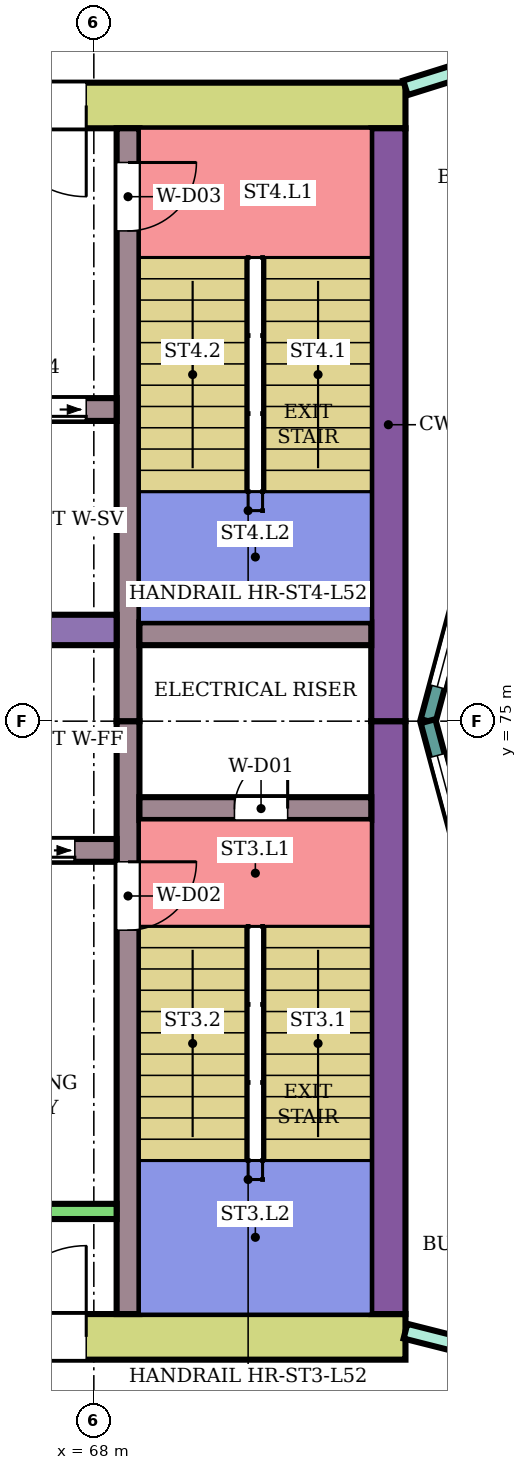
"""IFC4 building model, lengths in metres.
Left out: names, types, materials, properties, quantities, classifications, styles, units other than length and angle.
Written with IfcOpenShell. Run it as: python <this file> out.ifc"""

import sys

from ifc_helpers import new_model, si_unit, direction, frame, frame_2d, origin, place, context, subcontext, project, spatial, rectangle, extrude, element, fill, save


model = new_model("IFC4")
c1 = context("Model", 3, precision=1e-05, world=origin(), true_north=direction((0.0, 1.0)))
c2 = subcontext(c1, "Body", "Model", "MODEL_VIEW")
j1 = project(units=[si_unit("LENGTHUNIT", "METRE"), si_unit("PLANEANGLEUNIT", "RADIAN")], contexts=[c1])
p1 = place(None, origin())
s1 = spatial("IfcSite", under=j1, at=p1, CompositionType="ELEMENT")
p2 = place(p1, origin())
s2 = spatial("IfcBuilding", under=s1, at=p2, CompositionType="ELEMENT")
p3 = place(p2, frame((0.0, 0.0, 225.1)))
s3 = spatial("IfcBuildingStorey", under=s2, at=p3, CompositionType="ELEMENT", Elevation=225.1)
p4 = place(p3, frame((72.1, 66.9, 0.0), z_axis=(0.0, 0.0, 1.0), x_axis=(-1.0, 0.0, 0.0)))
e1 = element("IfcWall", 1, at=p4, inside=s3, PredefinedType="SHEAR", context=c2, shape_type="SweptSolid", body=[
    extrude(rectangle(XDim=14.9, YDim=0.6, at=frame_2d((7.45, 0.0))), origin(), (0.0, 0.0, 1.0), 3.8),
])
p5 = place(p4, frame((4.2, 0.0, 0.0)))
e2 = element("IfcOpeningElement", 2, at=p5, cuts=e1, PredefinedType="OPENING", context=c2, shape_type="SweptSolid", body=[
    extrude(rectangle(XDim=2.4, YDim=2.4, at=frame_2d((1.2, 1.2))), frame((0.0, 0.31, 0.0), z_axis=(0.0, -1.0, 0.0), x_axis=(1.0, 0.0, 0.0)), (0.0, 0.0, 1.0), 0.62),
])
p6 = place(p3, frame((72.1, 83.1, 0.0), z_axis=(0.0, 0.0, 1.0), x_axis=(-1.0, 0.0, 0.0)))
e3 = element("IfcWall", 3, at=p6, inside=s3, PredefinedType="SHEAR", context=c2, shape_type="SweptSolid", body=[
    extrude(rectangle(XDim=14.9, YDim=0.6, at=frame_2d((7.45, 0.0))), origin(), (0.0, 0.0, 1.0), 3.8),
])
p7 = place(p6, frame((4.2, 0.0, 0.0)))
e4 = element("IfcOpeningElement", 4, at=p7, cuts=e3, PredefinedType="OPENING", context=c2, shape_type="SweptSolid", body=[
    extrude(rectangle(XDim=2.4, YDim=2.4, at=frame_2d((1.2, 1.2))), frame((0.0, 0.31, 0.0), z_axis=(0.0, -1.0, 0.0), x_axis=(1.0, 0.0, 0.0)), (0.0, 0.0, 1.0), 0.62),
])
for number, where, z_axis, x_axis in (
    (5, (71.875, 75.0, 0.0), (0.0, 0.0, 1.0), (0.0, -1.0, 0.0)),
    (6, (71.875, 82.8, 0.0), (0.0, 0.0, 1.0), (0.0, -1.0, 0.0)),
):
    element("IfcWall", number, at=place(p3, frame(where, z_axis=z_axis, x_axis=x_axis)), inside=s3, PredefinedType="SHEAR", context=c2, shape_type="SweptSolid", body=[
        extrude(rectangle(XDim=7.8, YDim=0.45, at=frame_2d((3.9, 0.0))), origin(), (0.0, 0.0, 1.0), 3.8),
    ])
p8 = place(p3, frame((68.45, 75.0, 0.0), z_axis=(0.0, 0.0, 1.0), x_axis=(0.0, -1.0, 0.0)))
e7 = element("IfcWall", 7, at=p8, inside=s3, PredefinedType="SHEAR", context=c2, shape_type="SweptSolid", body=[
    extrude(rectangle(XDim=7.8, YDim=0.3, at=frame_2d((3.9, 0.0))), origin(), (0.0, 0.0, 1.0), 3.8),
])
p9 = place(p8, frame((1.85, 0.0, 0.0)))
e8 = element("IfcOpeningElement", 8, at=p9, cuts=e7, PredefinedType="OPENING", context=c2, shape_type="SweptSolid", body=[
    extrude(rectangle(XDim=0.9, YDim=2.1, at=frame_2d((0.45, 1.05))), frame((0.0, 0.16, 0.0), z_axis=(0.0, -1.0, 0.0), x_axis=(1.0, 0.0, 0.0)), (0.0, 0.0, 1.0), 0.32),
])
p10 = place(p3, frame((68.45, 82.8, 0.0), z_axis=(0.0, 0.0, 1.0), x_axis=(0.0, -1.0, 0.0)))
e9 = element("IfcWall", 9, at=p10, inside=s3, PredefinedType="SHEAR", context=c2, shape_type="SweptSolid", body=[
    extrude(rectangle(XDim=7.8, YDim=0.3, at=frame_2d((3.9, 0.0))), origin(), (0.0, 0.0, 1.0), 3.8),
])
p11 = place(p10, frame((0.45, 0.0, 0.0)))
e10 = element("IfcOpeningElement", 10, at=p11, cuts=e9, PredefinedType="OPENING", context=c2, shape_type="SweptSolid", body=[
    extrude(rectangle(XDim=0.9, YDim=2.1, at=frame_2d((0.45, 1.05))), frame((0.0, 0.16, 0.0), z_axis=(0.0, -1.0, 0.0), x_axis=(1.0, 0.0, 0.0)), (0.0, 0.0, 1.0), 0.32),
])
p12 = place(p3, frame((71.65, 73.85, 0.0), z_axis=(0.0, 0.0, 1.0), x_axis=(-1.0, 0.0, 0.0)))
e11 = element("IfcWall", 11, at=p12, inside=s3, PredefinedType="SHEAR", context=c2, shape_type="SweptSolid", body=[
    extrude(rectangle(XDim=3.05, YDim=0.3, at=frame_2d((1.525, 0.0))), origin(), (0.0, 0.0, 1.0), 3.8),
])
p13 = place(p12, frame((1.1, 0.0, 0.0)))
e12 = element("IfcOpeningElement", 12, at=p13, cuts=e11, PredefinedType="OPENING", context=c2, shape_type="SweptSolid", body=[
    extrude(rectangle(XDim=0.7, YDim=2.0, at=frame_2d((0.35, 1.0))), frame((0.0, 0.16, 0.0), z_axis=(0.0, -1.0, 0.0), x_axis=(1.0, 0.0, 0.0)), (0.0, 0.0, 1.0), 0.32),
])
p14 = place(p3, frame((71.65, 76.15, 0.0), z_axis=(0.0, 0.0, 1.0), x_axis=(-1.0, 0.0, 0.0)))
e13 = element("IfcWall", 13, at=p14, inside=s3, PredefinedType="SHEAR", context=c2, shape_type="SweptSolid", body=[
    extrude(rectangle(XDim=3.05, YDim=0.3, at=frame_2d((1.525, 0.0))), origin(), (0.0, 0.0, 1.0), 3.8),
])
p15 = place(p3, frame((68.3, 73.3, 0.0), z_axis=(0.0, 0.0, 1.0), x_axis=(-1.0, 0.0, 0.0)))
e14 = element("IfcWall", 14, at=p15, inside=s3, PredefinedType="SHEAR", context=c2, shape_type="SweptSolid", body=[
    extrude(rectangle(XDim=11.1, YDim=0.3, at=frame_2d((5.55, 0.0))), origin(), (0.0, 0.0, 1.0), 3.8),
])
p16 = place(p15, frame((0.55, 0.0, 0.0)))
e15 = element("IfcOpeningElement", 15, at=p16, cuts=e14, PredefinedType="OPENING", context=c2, shape_type="SweptSolid", body=[
    extrude(rectangle(XDim=1.1, YDim=2.1, at=frame_2d((0.55, 1.05))), frame((0.0, 0.16, 0.0), z_axis=(0.0, -1.0, 0.0), x_axis=(1.0, 0.0, 0.0)), (0.0, 0.0, 1.0), 0.32),
])
p17 = place(p15, frame((3.0, 0.0, 0.0)))
e16 = element("IfcOpeningElement", 16, at=p17, cuts=e14, PredefinedType="OPENING", context=c2, shape_type="SweptSolid", body=[
    extrude(rectangle(XDim=1.2, YDim=2.1, at=frame_2d((0.6, 1.05))), frame((0.0, 0.16, 0.0), z_axis=(0.0, -1.0, 0.0), x_axis=(1.0, 0.0, 0.0)), (0.0, 0.0, 1.0), 0.32),
])
p18 = place(p15, frame((5.5, 0.0, 0.0)))
e17 = element("IfcOpeningElement", 17, at=p18, cuts=e14, PredefinedType="OPENING", context=c2, shape_type="SweptSolid", body=[
    extrude(rectangle(XDim=1.2, YDim=2.1, at=frame_2d((0.6, 1.05))), frame((0.0, 0.16, 0.0), z_axis=(0.0, -1.0, 0.0), x_axis=(1.0, 0.0, 0.0)), (0.0, 0.0, 1.0), 0.32),
])
p19 = place(p15, frame((8.85, 0.0, 0.0)))
e18 = element("IfcOpeningElement", 18, at=p19, cuts=e14, PredefinedType="OPENING", context=c2, shape_type="SweptSolid", body=[
    extrude(rectangle(XDim=0.9, YDim=2.1, at=frame_2d((0.45, 1.05))), frame((0.0, 0.16, 0.0), z_axis=(0.0, -1.0, 0.0), x_axis=(1.0, 0.0, 0.0)), (0.0, 0.0, 1.0), 0.32),
])
p20 = place(p3, frame((68.3, 76.2, 0.0), z_axis=(0.0, 0.0, 1.0), x_axis=(-1.0, 0.0, 0.0)))
e19 = element("IfcWall", 19, at=p20, inside=s3, PredefinedType="SHEAR", context=c2, shape_type="SweptSolid", body=[
    extrude(rectangle(XDim=11.1, YDim=0.4, at=frame_2d((5.55, 0.0))), origin(), (0.0, 0.0, 1.0), 3.8),
])
p21 = place(p3, frame((68.3, 79.1, 0.0), z_axis=(0.0, 0.0, 1.0), x_axis=(-1.0, 0.0, 0.0)))
e20 = element("IfcWall", 20, at=p21, inside=s3, PredefinedType="SHEAR", context=c2, shape_type="SweptSolid", body=[
    extrude(rectangle(XDim=11.1, YDim=0.3, at=frame_2d((5.55, 0.0))), origin(), (0.0, 0.0, 1.0), 3.8),
])
p22 = place(p21, frame((0.4, 0.0, 0.0)))
e21 = element("IfcOpeningElement", 21, at=p22, cuts=e20, PredefinedType="OPENING", context=c2, shape_type="SweptSolid", body=[
    extrude(rectangle(XDim=1.4, YDim=2.1, at=frame_2d((0.7, 1.05))), frame((0.0, 0.16, 0.0), z_axis=(0.0, -1.0, 0.0), x_axis=(1.0, 0.0, 0.0)), (0.0, 0.0, 1.0), 0.32),
])
p23 = place(p21, frame((3.0, 0.0, 0.0)))
e22 = element("IfcOpeningElement", 22, at=p23, cuts=e20, PredefinedType="OPENING", context=c2, shape_type="SweptSolid", body=[
    extrude(rectangle(XDim=1.2, YDim=2.1, at=frame_2d((0.6, 1.05))), frame((0.0, 0.16, 0.0), z_axis=(0.0, -1.0, 0.0), x_axis=(1.0, 0.0, 0.0)), (0.0, 0.0, 1.0), 0.32),
])
p24 = place(p21, frame((5.567, 0.0, 0.0)))
e23 = element("IfcOpeningElement", 23, at=p24, cuts=e20, PredefinedType="OPENING", context=c2, shape_type="SweptSolid", body=[
    extrude(rectangle(XDim=0.9, YDim=2.1, at=frame_2d((0.45, 1.05))), frame((0.0, 0.16, 0.0), z_axis=(0.0, -1.0, 0.0), x_axis=(1.0, 0.0, 0.0)), (0.0, 0.0, 1.0), 0.32),
])
p25 = place(p21, frame((7.6, 0.0, 0.0)))
e24 = element("IfcOpeningElement", 24, at=p25, cuts=e20, PredefinedType="OPENING", context=c2, shape_type="SweptSolid", body=[
    extrude(rectangle(XDim=0.9, YDim=2.1, at=frame_2d((0.45, 1.05))), frame((0.0, 0.16, 0.0), z_axis=(0.0, -1.0, 0.0), x_axis=(1.0, 0.0, 0.0)), (0.0, 0.0, 1.0), 0.32),
])
p26 = place(p21, frame((9.633, 0.0, 0.0)))
e25 = element("IfcOpeningElement", 25, at=p26, cuts=e20, PredefinedType="OPENING", context=c2, shape_type="SweptSolid", body=[
    extrude(rectangle(XDim=0.9, YDim=2.1, at=frame_2d((0.45, 1.05))), frame((0.0, 0.16, 0.0), z_axis=(0.0, -1.0, 0.0), x_axis=(1.0, 0.0, 0.0)), (0.0, 0.0, 1.0), 0.32),
])
p27 = place(p3, frame((68.3, 68.55, 0.0), z_axis=(0.0, 0.0, 1.0), x_axis=(-1.0, 0.0, 0.0)))
e26 = element("IfcWall", 26, at=p27, inside=s3, PredefinedType="SHEAR", context=c2, shape_type="SweptSolid", body=[
    extrude(rectangle(XDim=4.35, YDim=0.2, at=frame_2d((2.175, 0.0))), origin(), (0.0, 0.0, 1.0), 3.8),
])
p28 = place(p3, frame((73.415, 78.802, 0.0), z_axis=(0.0, 0.0, 1.0), x_axis=(-0.258789828301, -0.965933654434, 0.0)))
e27 = element("IfcWall", 27, at=p28, inside=s3, PredefinedType="NOTDEFINED", context=c2, shape_type="SweptSolid", body=[
    extrude(rectangle(XDim=3.936, YDim=0.2, at=frame_2d((1.968, 0.0))), origin(), (0.0, 0.0, 1.0), 4.2),
])
p29 = place(p28, frame((0.468, 0.0, 0.9)))
e28 = element("IfcOpeningElement", 28, at=p29, cuts=e27, PredefinedType="OPENING", context=c2, shape_type="SweptSolid", body=[
    extrude(rectangle(XDim=3.0, YDim=2.3, at=frame_2d((1.5, 1.15))), frame((0.0, 0.11, 0.0), z_axis=(0.0, -1.0, 0.0), x_axis=(1.0, 0.0, 0.0)), (0.0, 0.0, 1.0), 0.22),
])
p30 = place(p3, frame((72.396, 75.0, 0.0), z_axis=(0.0, 0.0, 1.0), x_axis=(0.258789828301, -0.965933654434, 0.0)))
e29 = element("IfcWall", 29, at=p30, inside=s3, PredefinedType="NOTDEFINED", context=c2, shape_type="SweptSolid", body=[
    extrude(rectangle(XDim=3.936, YDim=0.2, at=frame_2d((1.968, 0.0))), origin(), (0.0, 0.0, 1.0), 4.2),
])
p31 = place(p30, frame((0.468, 0.0, 0.9)))
e30 = element("IfcOpeningElement", 30, at=p31, cuts=e29, PredefinedType="OPENING", context=c2, shape_type="SweptSolid", body=[
    extrude(rectangle(XDim=3.0, YDim=2.3, at=frame_2d((1.5, 1.15))), frame((0.0, 0.11, 0.0), z_axis=(0.0, -1.0, 0.0), x_axis=(1.0, 0.0, 0.0)), (0.0, 0.0, 1.0), 0.22),
])
p32 = place(p3, frame((72.1, 66.975, 0.0), z_axis=(0.0, 0.0, 1.0), x_axis=(0.969471314457, -0.245204752086, 0.0)))
e31 = element("IfcWall", 31, at=p32, inside=s3, PredefinedType="PARTITIONING", context=c2, shape_type="SweptSolid", body=[
    extrude(rectangle(XDim=2.582, YDim=0.2, at=frame_2d((1.291, 0.0))), origin(), (0.0, 0.0, 1.0), 3.75),
])
p33 = place(p32, frame((0.841, 0.0, 0.0)))
e32 = element("IfcOpeningElement", 32, at=p33, cuts=e31, PredefinedType="OPENING", context=c2, shape_type="SweptSolid", body=[
    extrude(rectangle(XDim=0.9, YDim=2.1, at=frame_2d((0.45, 1.05))), frame((0.0, 0.11, 0.0), z_axis=(0.0, -1.0, 0.0), x_axis=(1.0, 0.0, 0.0)), (0.0, 0.0, 1.0), 0.22),
])
p34 = place(p3, frame((72.1, 83.332, 0.0), z_axis=(0.0, 0.0, 1.0), x_axis=(0.954233106619, 0.299063836383, 0.0)))
e33 = element("IfcWall", 33, at=p34, inside=s3, PredefinedType="PARTITIONING", context=c2, shape_type="SweptSolid", body=[
    extrude(rectangle(XDim=2.414, YDim=0.2, at=frame_2d((1.207, 0.0))), origin(), (0.0, 0.0, 1.0), 3.75),
])
p35 = place(p34, frame((0.762, 0.0, 0.0)))
e34 = element("IfcOpeningElement", 34, at=p35, cuts=e33, PredefinedType="OPENING", context=c2, shape_type="SweptSolid", body=[
    extrude(rectangle(XDim=0.9, YDim=2.1, at=frame_2d((0.45, 1.05))), frame((0.0, 0.11, 0.0), z_axis=(0.0, -1.0, 0.0), x_axis=(1.0, 0.0, 0.0)), (0.0, 0.0, 1.0), 0.22),
])
p36 = place(p29, origin())
e35 = element("IfcWindow", 35, at=p36, inside=s3, PartitioningType="SINGLE_PANEL", PredefinedType="WINDOW", context=c2, shape_type="SweptSolid", body=[
    extrude(rectangle(XDim=3.0, YDim=2.3, at=frame_2d((1.5, 1.15))), frame((0.0, 0.03, 0.0), z_axis=(0.0, -1.0, 0.0), x_axis=(1.0, 0.0, 0.0)), (0.0, 0.0, 1.0), 0.06),
])
fill(e28, e35)
p37 = place(p31, origin())
e36 = element("IfcWindow", 36, at=p37, inside=s3, PartitioningType="SINGLE_PANEL", PredefinedType="WINDOW", context=c2, shape_type="SweptSolid", body=[
    extrude(rectangle(XDim=3.0, YDim=2.3, at=frame_2d((1.5, 1.15))), frame((0.0, 0.03, 0.0), z_axis=(0.0, -1.0, 0.0), x_axis=(1.0, 0.0, 0.0)), (0.0, 0.0, 1.0), 0.06),
])
fill(e30, e36)
p38 = place(p13, frame((0.7, 0.0, 0.0), z_axis=(0.0, 0.0, 1.0), x_axis=(-1.0, 0.0, 0.0)))
e37 = element("IfcDoor", 37, at=p38, inside=s3, OperationType="SINGLE_SWING_RIGHT", PredefinedType="DOOR", context=c2, shape_type="SweptSolid", body=[
    extrude(rectangle(XDim=0.7, YDim=2.0, at=frame_2d((0.35, 1.0))), frame((0.0, 0.025, 0.0), z_axis=(0.0, -1.0, 0.0), x_axis=(1.0, 0.0, 0.0)), (0.0, 0.0, 1.0), 0.05),
])
fill(e12, e37)
p39 = place(p9, origin())
e38 = element("IfcDoor", 38, at=p39, inside=s3, OperationType="SINGLE_SWING_LEFT", PredefinedType="DOOR", context=c2, shape_type="SweptSolid", body=[
    extrude(rectangle(XDim=0.9, YDim=2.1, at=frame_2d((0.45, 1.05))), frame((0.0, 0.025, 0.0), z_axis=(0.0, -1.0, 0.0), x_axis=(1.0, 0.0, 0.0)), (0.0, 0.0, 1.0), 0.05),
])
fill(e8, e38)
p40 = place(p11, origin())
e39 = element("IfcDoor", 39, at=p40, inside=s3, OperationType="SINGLE_SWING_LEFT", PredefinedType="DOOR", context=c2, shape_type="SweptSolid", body=[
    extrude(rectangle(XDim=0.9, YDim=2.1, at=frame_2d((0.45, 1.05))), frame((0.0, 0.025, 0.0), z_axis=(0.0, -1.0, 0.0), x_axis=(1.0, 0.0, 0.0)), (0.0, 0.0, 1.0), 0.05),
])
fill(e10, e39)
p41 = place(p16, origin())
e40 = element("IfcDoor", 40, at=p41, inside=s3, OperationType="DOUBLE_DOOR_SLIDING", PredefinedType="DOOR", context=c2, shape_type="SweptSolid", body=[
    extrude(rectangle(XDim=1.1, YDim=2.1, at=frame_2d((0.55, 1.05))), frame((0.0, 0.025, 0.0), z_axis=(0.0, -1.0, 0.0), x_axis=(1.0, 0.0, 0.0)), (0.0, 0.0, 1.0), 0.05),
])
fill(e15, e40)
p42 = place(p22, origin())
e41 = element("IfcDoor", 41, at=p42, inside=s3, OperationType="DOUBLE_DOOR_SLIDING", PredefinedType="DOOR", context=c2, shape_type="SweptSolid", body=[
    extrude(rectangle(XDim=1.4, YDim=2.1, at=frame_2d((0.7, 1.05))), frame((0.0, 0.025, 0.0), z_axis=(0.0, -1.0, 0.0), x_axis=(1.0, 0.0, 0.0)), (0.0, 0.0, 1.0), 0.05),
])
fill(e21, e41)
p43 = place(p5, frame((2.4, 0.0, 0.0), z_axis=(0.0, 0.0, 1.0), x_axis=(-1.0, 0.0, 0.0)))
e42 = element("IfcDoor", 42, at=p43, inside=s3, OperationType="DOUBLE_DOOR_SINGLE_SWING", PredefinedType="DOOR", context=c2, shape_type="SweptSolid", body=[
    extrude(rectangle(XDim=2.4, YDim=2.4, at=frame_2d((1.2, 1.2))), frame((0.0, 0.025, 0.0), z_axis=(0.0, -1.0, 0.0), x_axis=(1.0, 0.0, 0.0)), (0.0, 0.0, 1.0), 0.05),
])
fill(e2, e42)
p44 = place(p7, origin())
e43 = element("IfcDoor", 43, at=p44, inside=s3, OperationType="DOUBLE_DOOR_SINGLE_SWING", PredefinedType="DOOR", context=c2, shape_type="SweptSolid", body=[
    extrude(rectangle(XDim=2.4, YDim=2.4, at=frame_2d((1.2, 1.2))), frame((0.0, 0.025, 0.0), z_axis=(0.0, -1.0, 0.0), x_axis=(1.0, 0.0, 0.0)), (0.0, 0.0, 1.0), 0.05),
])
fill(e4, e43)
save(model, sys.argv[1])
